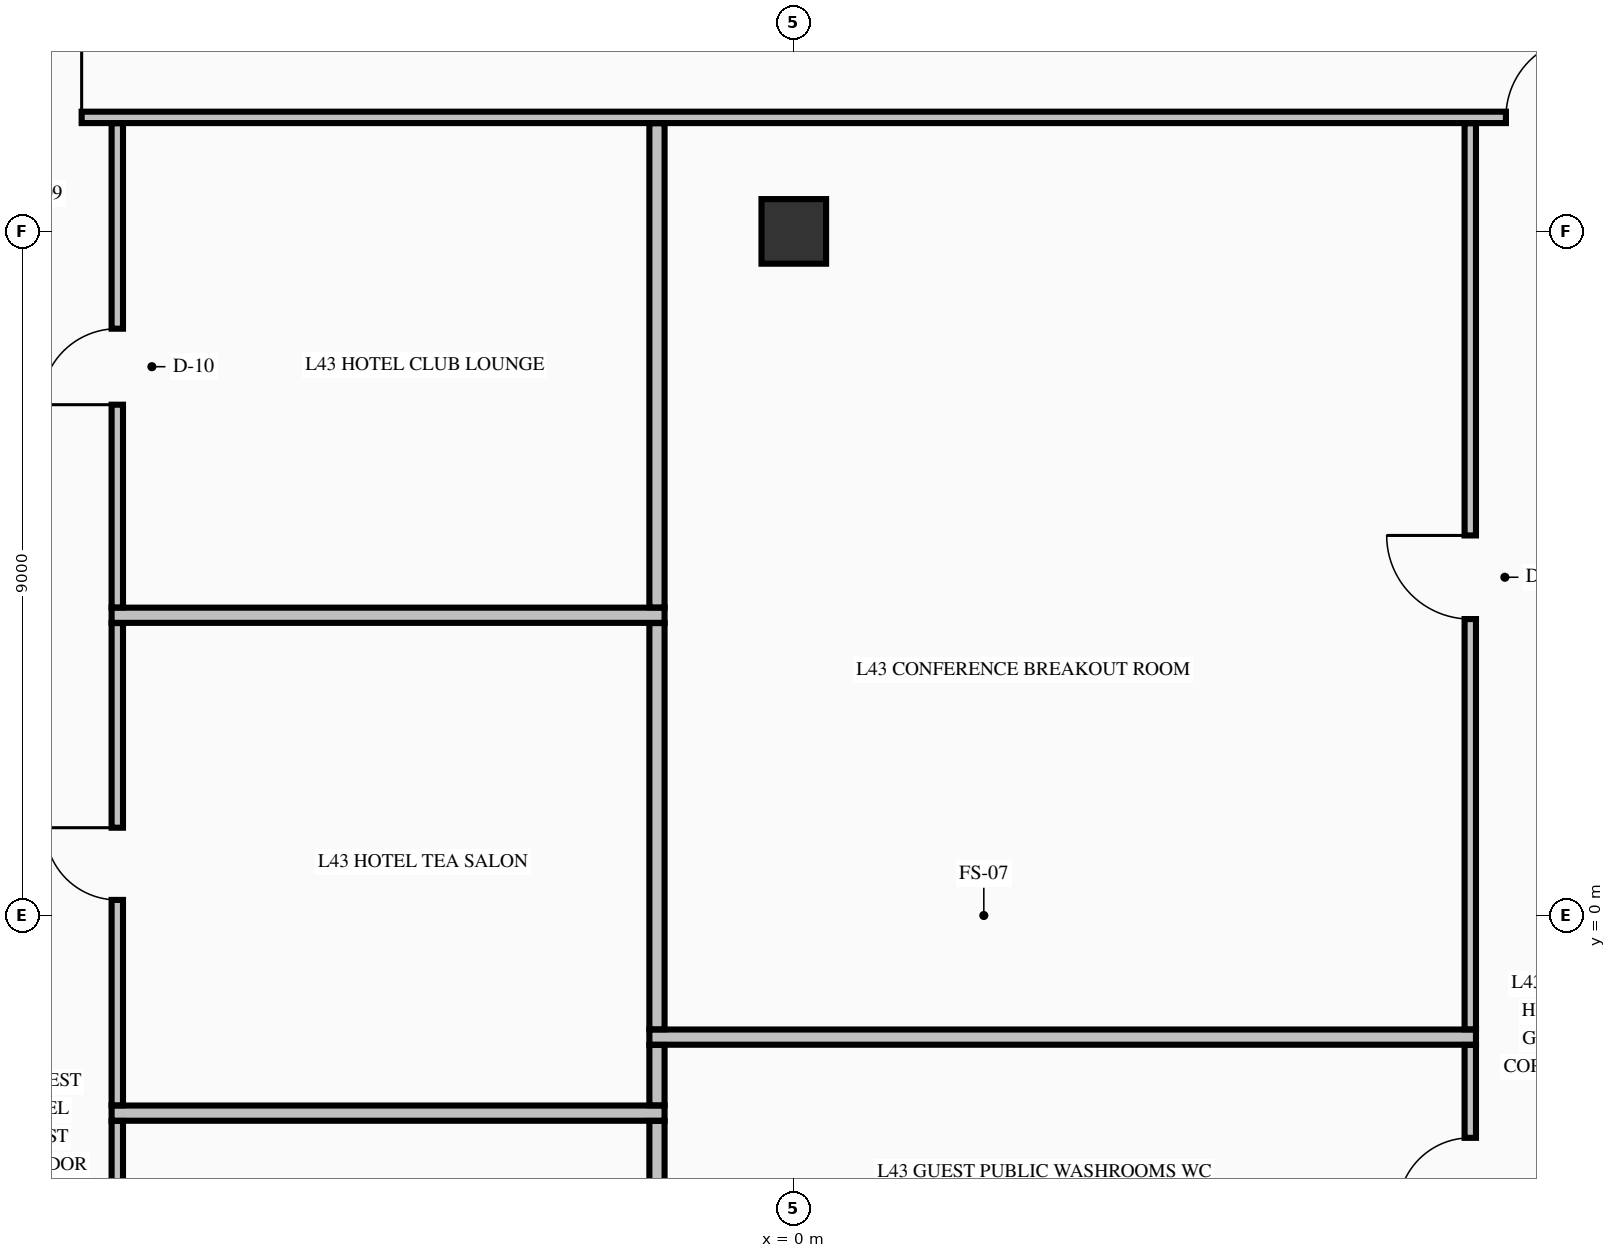
"""IFC4 building model, lengths in metres.
Left out: names, types, materials, properties, quantities, classifications, styles, units other than length and angle.
Written with IfcOpenShell. Run it as: python <this file> out.ifc"""

import sys

from ifc_helpers import new_model, si_unit, direction, frame, frame_2d, origin, origin_2d, place, context, subcontext, project, spatial, rectangle, extrude, element, fill, save


model = new_model("IFC4")
c1 = context("Model", 3, precision=1e-05, world=origin(), true_north=direction((0.0, 1.0)))
c2 = subcontext(c1, "Body", "Model", "MODEL_VIEW")
j1 = project(units=[si_unit("LENGTHUNIT", "METRE"), si_unit("PLANEANGLEUNIT", "RADIAN")], contexts=[c1])
p1 = place(None, origin())
s1 = spatial("IfcSite", under=j1, at=p1, CompositionType="ELEMENT")
p2 = place(p1, origin())
s2 = spatial("IfcBuilding", under=s1, at=p2, CompositionType="ELEMENT")
p3 = place(p2, frame((0.0, 0.0, 169.46)))
s3 = spatial("IfcBuildingStorey", under=s2, at=p3, CompositionType="ELEMENT", Elevation=169.46)
p4 = place(p3, frame((0.0, 9.0, -0.25), z_axis=(0.0, 0.0, 1.0), x_axis=(1.0, 0.0, 0.0)))
e1 = element("IfcColumn", 1, at=p4, inside=s3, PredefinedType="COLUMN", context=c2, shape_type="SweptSolid", body=[
    extrude(rectangle(XDim=0.85, YDim=0.85, at=origin_2d()), origin(), (0.0, 0.0, 1.0), 3.4),
])
p5 = place(p3, frame((-8.975, -2.6, 0.0), z_axis=(0.0, 0.0, 1.0), x_axis=(1.0, 0.0, 0.0)))
e2 = element("IfcWall", 2, at=p5, inside=s3, PredefinedType="PARTITIONING", context=c2, shape_type="SweptSolid", body=[
    extrude(rectangle(XDim=7.275, YDim=0.2, at=frame_2d((3.638, 0.0))), origin(), (0.0, 0.0, 1.0), 3.15),
])
p6 = place(p3, frame((-1.9, -1.6, 0.0), z_axis=(0.0, 0.0, 1.0), x_axis=(1.0, 0.0, 0.0)))
e3 = element("IfcWall", 3, at=p6, inside=s3, PredefinedType="PARTITIONING", context=c2, shape_type="SweptSolid", body=[
    extrude(rectangle(XDim=10.875, YDim=0.2, at=frame_2d((5.438, 0.0))), origin(), (0.0, 0.0, 1.0), 3.15),
])
p7 = place(p3, frame((-8.975, 3.95, 0.0), z_axis=(0.0, 0.0, 1.0), x_axis=(1.0, 0.0, 0.0)))
e4 = element("IfcWall", 4, at=p7, inside=s3, PredefinedType="PARTITIONING", context=c2, shape_type="SweptSolid", body=[
    extrude(rectangle(XDim=7.275, YDim=0.2, at=frame_2d((3.638, 0.0))), origin(), (0.0, 0.0, 1.0), 3.15),
])
p8 = place(p3, frame((-10.569, 10.5, 0.0), z_axis=(0.0, 0.0, 1.0), x_axis=(1.0, 0.0, 0.0)))
e5 = element("IfcWall", 5, at=p8, inside=s3, PredefinedType="PARTITIONING", context=c2, shape_type="SweptSolid", body=[
    extrude(rectangle(XDim=21.138, YDim=0.15, at=frame_2d((10.569, 0.0))), origin(), (0.0, 0.0, 1.0), 3.15),
])
p9 = place(p8, frame((0.15, 0.0, 0.0)))
e6 = element("IfcOpeningElement", 6, at=p9, cuts=e5, PredefinedType="OPENING", context=c2, shape_type="SweptSolid", body=[
    extrude(rectangle(XDim=1.05, YDim=2.15, at=frame_2d((0.525, 1.075))), frame((0.0, 0.085, 0.0), z_axis=(0.0, -1.0, 0.0), x_axis=(1.0, 0.0, 0.0)), (0.0, 0.0, 1.0), 0.17),
])
p10 = place(p8, frame((19.938, 0.0, 0.0)))
e7 = element("IfcOpeningElement", 7, at=p10, cuts=e5, PredefinedType="OPENING", context=c2, shape_type="SweptSolid", body=[
    extrude(rectangle(XDim=1.05, YDim=2.15, at=frame_2d((0.525, 1.075))), frame((0.0, 0.085, 0.0), z_axis=(0.0, -1.0, 0.0), x_axis=(1.0, 0.0, 0.0)), (0.0, 0.0, 1.0), 0.17),
])
p11 = place(p3, frame((-8.9, -9.872, 0.0), z_axis=(0.0, 0.0, 1.0), x_axis=(0.0, 1.0, 0.0)))
e8 = element("IfcWall", 8, at=p11, inside=s3, PredefinedType="PARTITIONING", context=c2, shape_type="SweptSolid", body=[
    extrude(rectangle(XDim=7.169, YDim=0.15, at=frame_2d((3.584, 0.0))), origin(), (0.0, 0.0, 1.0), 3.15),
])
p12 = place(p11, frame((3.102, 0.0, 0.0)))
e9 = element("IfcOpeningElement", 9, at=p12, cuts=e8, PredefinedType="OPENING", context=c2, shape_type="SweptSolid", body=[
    extrude(rectangle(XDim=1.0, YDim=2.15, at=frame_2d((0.5, 1.075))), frame((0.0, 0.085, 0.0), z_axis=(0.0, -1.0, 0.0), x_axis=(1.0, 0.0, 0.0)), (0.0, 0.0, 1.0), 0.17),
])
p13 = place(p3, frame((-8.9, -2.497, 0.0), z_axis=(0.0, 0.0, 1.0), x_axis=(0.0, 1.0, 0.0)))
e10 = element("IfcWall", 10, at=p13, inside=s3, PredefinedType="PARTITIONING", context=c2, shape_type="SweptSolid", body=[
    extrude(rectangle(XDim=6.344, YDim=0.15, at=frame_2d((3.172, 0.0))), origin(), (0.0, 0.0, 1.0), 3.15),
])
p14 = place(p13, frame((2.702, 0.0, 0.0)))
e11 = element("IfcOpeningElement", 11, at=p14, cuts=e10, PredefinedType="OPENING", context=c2, shape_type="SweptSolid", body=[
    extrude(rectangle(XDim=0.95, YDim=2.15, at=frame_2d((0.475, 1.075))), frame((0.0, 0.085, 0.0), z_axis=(0.0, -1.0, 0.0), x_axis=(1.0, 0.0, 0.0)), (0.0, 0.0, 1.0), 0.17),
])
p15 = place(p3, frame((-8.9, 4.053, 0.0), z_axis=(0.0, 0.0, 1.0), x_axis=(0.0, 1.0, 0.0)))
e12 = element("IfcWall", 12, at=p15, inside=s3, PredefinedType="PARTITIONING", context=c2, shape_type="SweptSolid", body=[
    extrude(rectangle(XDim=6.369, YDim=0.15, at=frame_2d((3.185, 0.0))), origin(), (0.0, 0.0, 1.0), 3.15),
])
p16 = place(p15, frame((2.667, 0.0, 0.0)))
e13 = element("IfcOpeningElement", 13, at=p16, cuts=e12, PredefinedType="OPENING", context=c2, shape_type="SweptSolid", body=[
    extrude(rectangle(XDim=1.0, YDim=2.15, at=frame_2d((0.5, 1.075))), frame((0.0, 0.085, 0.0), z_axis=(0.0, -1.0, 0.0), x_axis=(1.0, 0.0, 0.0)), (0.0, 0.0, 1.0), 0.17),
])
p17 = place(p3, frame((-1.8, -5.097, 0.0), z_axis=(0.0, 0.0, 1.0), x_axis=(0.0, 1.0, 0.0)))
e14 = element("IfcWall", 14, at=p17, inside=s3, PredefinedType="PARTITIONING", context=c2, shape_type="SweptSolid", body=[
    extrude(rectangle(XDim=2.394, YDim=0.2, at=frame_2d((1.197, 0.0))), origin(), (0.0, 0.0, 1.0), 3.15),
])
p18 = place(p3, frame((-1.8, -2.497, 0.0), z_axis=(0.0, 0.0, 1.0), x_axis=(0.0, 1.0, 0.0)))
e15 = element("IfcWall", 15, at=p18, inside=s3, PredefinedType="PARTITIONING", context=c2, shape_type="SweptSolid", body=[
    extrude(rectangle(XDim=0.794, YDim=0.2, at=frame_2d((0.397, 0.0))), origin(), (0.0, 0.0, 1.0), 3.15),
])
p19 = place(p3, frame((-1.8, -1.497, 0.0), z_axis=(0.0, 0.0, 1.0), x_axis=(0.0, 1.0, 0.0)))
e16 = element("IfcWall", 16, at=p19, inside=s3, PredefinedType="PARTITIONING", context=c2, shape_type="SweptSolid", body=[
    extrude(rectangle(XDim=5.344, YDim=0.2, at=frame_2d((2.672, 0.0))), origin(), (0.0, 0.0, 1.0), 3.15),
])
p20 = place(p3, frame((-1.8, 4.053, 0.0), z_axis=(0.0, 0.0, 1.0), x_axis=(0.0, 1.0, 0.0)))
e17 = element("IfcWall", 17, at=p20, inside=s3, PredefinedType="PARTITIONING", context=c2, shape_type="SweptSolid", body=[
    extrude(rectangle(XDim=6.369, YDim=0.2, at=frame_2d((3.185, 0.0))), origin(), (0.0, 0.0, 1.0), 3.15),
])
p21 = place(p3, frame((8.9, -5.097, 0.0), z_axis=(0.0, 0.0, 1.0), x_axis=(0.0, 1.0, 0.0)))
e18 = element("IfcWall", 18, at=p21, inside=s3, PredefinedType="PARTITIONING", context=c2, shape_type="SweptSolid", body=[
    extrude(rectangle(XDim=3.394, YDim=0.15, at=frame_2d((1.697, 0.0))), origin(), (0.0, 0.0, 1.0), 3.15),
])
p22 = place(p21, frame((1.222, 0.0, 0.0)))
e19 = element("IfcOpeningElement", 19, at=p22, cuts=e18, PredefinedType="OPENING", context=c2, shape_type="SweptSolid", body=[
    extrude(rectangle(XDim=0.95, YDim=2.15, at=frame_2d((0.475, 1.075))), frame((0.0, 0.085, 0.0), z_axis=(0.0, -1.0, 0.0), x_axis=(1.0, 0.0, 0.0)), (0.0, 0.0, 1.0), 0.17),
])
p23 = place(p3, frame((8.9, -1.497, 0.0), z_axis=(0.0, 0.0, 1.0), x_axis=(0.0, 1.0, 0.0)))
e20 = element("IfcWall", 20, at=p23, inside=s3, PredefinedType="PARTITIONING", context=c2, shape_type="SweptSolid", body=[
    extrude(rectangle(XDim=11.919, YDim=0.15, at=frame_2d((5.959, 0.0))), origin(), (0.0, 0.0, 1.0), 3.15),
])
p24 = place(p23, frame((5.397, 0.0, 0.0)))
e21 = element("IfcOpeningElement", 21, at=p24, cuts=e20, PredefinedType="OPENING", context=c2, shape_type="SweptSolid", body=[
    extrude(rectangle(XDim=1.1, YDim=2.15, at=frame_2d((0.55, 1.075))), frame((0.0, 0.085, 0.0), z_axis=(0.0, -1.0, 0.0), x_axis=(1.0, 0.0, 0.0)), (0.0, 0.0, 1.0), 0.17),
])
p25 = place(p9, origin())
e22 = element("IfcDoor", 22, at=p25, inside=s3, OperationType="SINGLE_SWING_RIGHT", PredefinedType="DOOR", context=c2, shape_type="SweptSolid", body=[
    extrude(rectangle(XDim=1.05, YDim=2.15, at=frame_2d((0.525, 1.075))), frame((0.0, 0.025, 0.0), z_axis=(0.0, -1.0, 0.0), x_axis=(1.0, 0.0, 0.0)), (0.0, 0.0, 1.0), 0.05),
])
fill(e6, e22)
p26 = place(p10, origin())
e23 = element("IfcDoor", 23, at=p26, inside=s3, OperationType="SINGLE_SWING_RIGHT", PredefinedType="DOOR", context=c2, shape_type="SweptSolid", body=[
    extrude(rectangle(XDim=1.05, YDim=2.15, at=frame_2d((0.525, 1.075))), frame((0.0, 0.025, 0.0), z_axis=(0.0, -1.0, 0.0), x_axis=(1.0, 0.0, 0.0)), (0.0, 0.0, 1.0), 0.05),
])
fill(e7, e23)
p27 = place(p16, origin())
e24 = element("IfcDoor", 24, at=p27, inside=s3, OperationType="SINGLE_SWING_LEFT", PredefinedType="DOOR", context=c2, shape_type="SweptSolid", body=[
    extrude(rectangle(XDim=1.0, YDim=2.15, at=frame_2d((0.5, 1.075))), frame((0.0, 0.025, 0.0), z_axis=(0.0, -1.0, 0.0), x_axis=(1.0, 0.0, 0.0)), (0.0, 0.0, 1.0), 0.05),
])
fill(e13, e24)
p28 = place(p14, origin())
e25 = element("IfcDoor", 25, at=p28, inside=s3, OperationType="SINGLE_SWING_RIGHT", PredefinedType="DOOR", context=c2, shape_type="SweptSolid", body=[
    extrude(rectangle(XDim=0.95, YDim=2.15, at=frame_2d((0.475, 1.075))), frame((0.0, 0.025, 0.0), z_axis=(0.0, -1.0, 0.0), x_axis=(1.0, 0.0, 0.0)), (0.0, 0.0, 1.0), 0.05),
])
fill(e11, e25)
p29 = place(p24, origin())
e26 = element("IfcDoor", 26, at=p29, inside=s3, OperationType="SINGLE_SWING_RIGHT", PredefinedType="DOOR", context=c2, shape_type="SweptSolid", body=[
    extrude(rectangle(XDim=1.1, YDim=2.15, at=frame_2d((0.55, 1.075))), frame((0.0, 0.025, 0.0), z_axis=(0.0, -1.0, 0.0), x_axis=(1.0, 0.0, 0.0)), (0.0, 0.0, 1.0), 0.05),
])
fill(e21, e26)
p30 = place(p22, origin())
e27 = element("IfcDoor", 27, at=p30, inside=s3, OperationType="SINGLE_SWING_LEFT", PredefinedType="DOOR", context=c2, shape_type="SweptSolid", body=[
    extrude(rectangle(XDim=0.95, YDim=2.15, at=frame_2d((0.475, 1.075))), frame((0.0, 0.025, 0.0), z_axis=(0.0, -1.0, 0.0), x_axis=(1.0, 0.0, 0.0)), (0.0, 0.0, 1.0), 0.05),
])
fill(e19, e27)
save(model, sys.argv[1])
